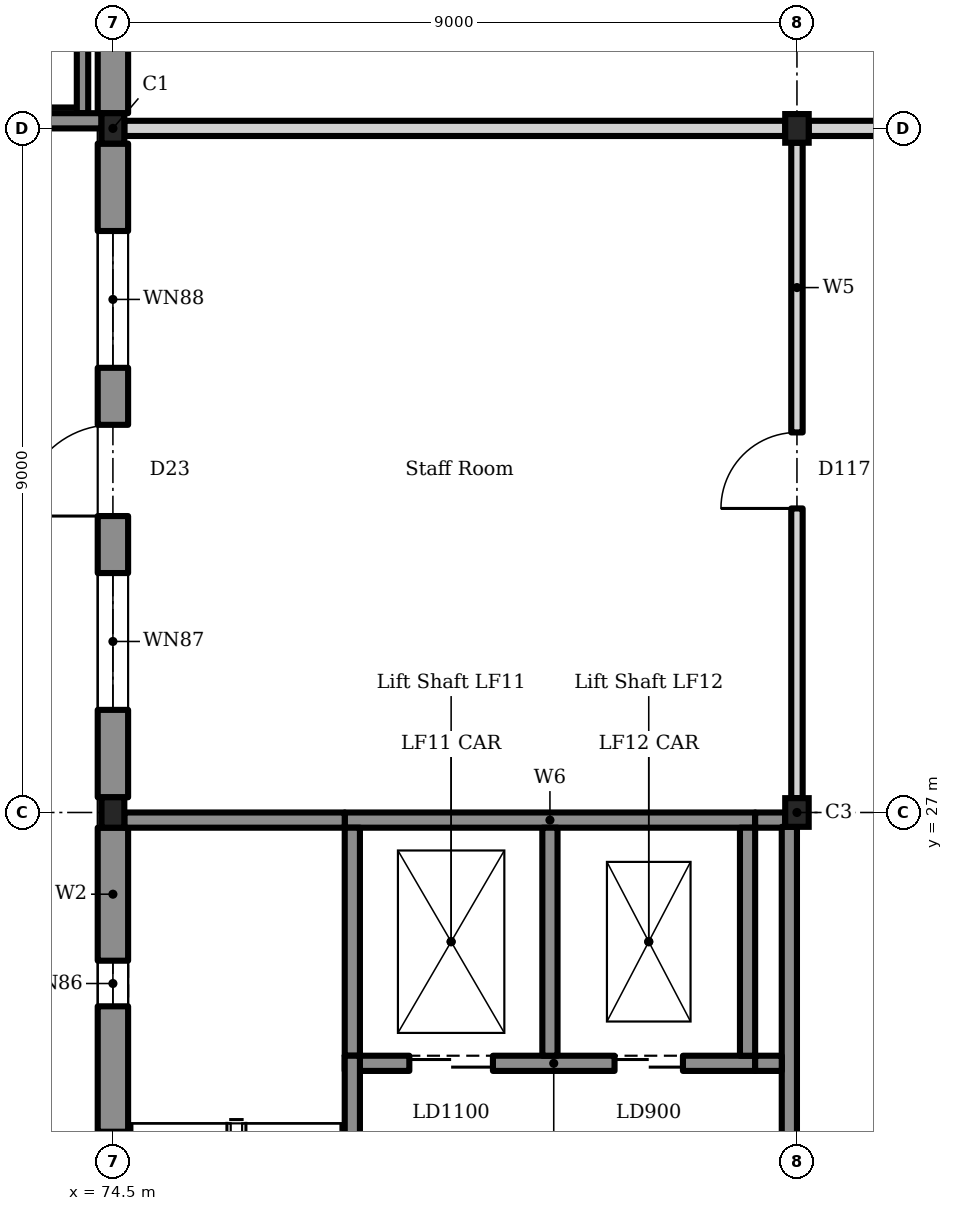
"""IFC4 building model, lengths in metres.
Left out: names, types, materials, properties, quantities, classifications, styles, units other than length and angle.
Written with IfcOpenShell. Run it as: python <this file> out.ifc"""

import sys

from ifc_helpers import new_model, si_unit, direction, frame, frame_2d, origin, origin_2d, place, context, subcontext, project, spatial, rectangle, i_section, extrude, element, fill, save


model = new_model("IFC4")
c1 = context("Model", 3, precision=1e-05, world=origin(), true_north=direction((0.0, 1.0)))
c2 = subcontext(c1, "Body", "Model", "MODEL_VIEW")
j1 = project(units=[si_unit("LENGTHUNIT", "METRE"), si_unit("PLANEANGLEUNIT", "RADIAN")], contexts=[c1])
p1 = place(None, origin())
s1 = spatial("IfcSite", under=j1, at=p1, CompositionType="ELEMENT")
p2 = place(p1, origin())
s2 = spatial("IfcBuilding", under=s1, at=p2, CompositionType="ELEMENT")
p3 = place(p2, frame((0.0, 0.0, 9.9)))
s3 = spatial("IfcBuildingStorey", under=s2, at=p3, CompositionType="ELEMENT", Elevation=9.9)
p4 = place(p3, frame((74.5, 27.0, 0.0), z_axis=(0.0, 0.0, 1.0), x_axis=(1.0, 0.0, 0.0)))
e1 = element("IfcColumn", 1, at=p4, inside=s3, PredefinedType="COLUMN", context=c2, shape_type="SweptSolid", body=[
    extrude(i_section(OverallWidth=0.3, OverallDepth=0.4, WebThickness=0.013, FlangeThickness=0.024, FilletRadius=0.027, at=origin_2d()), origin(), (0.0, 0.0, 1.0), 4.5),
])
p5 = place(p3, frame((83.5, 27.0, 0.0), z_axis=(0.0, 0.0, 1.0), x_axis=(1.0, 0.0, 0.0)))
e2 = element("IfcColumn", 2, at=p5, inside=s3, PredefinedType="COLUMN", context=c2, shape_type="SweptSolid", body=[
    extrude(i_section(OverallWidth=0.309, OverallDepth=0.377, WebThickness=0.021, FlangeThickness=0.04, FilletRadius=0.027, at=origin_2d()), origin(), (0.0, 0.0, 1.0), 4.5),
])
p6 = place(p3, frame((74.5, 36.0, 0.0), z_axis=(0.0, 0.0, 1.0), x_axis=(1.0, 0.0, 0.0)))
e3 = element("IfcColumn", 3, at=p6, inside=s3, PredefinedType="COLUMN", context=c2, shape_type="SweptSolid", body=[
    extrude(i_section(OverallWidth=0.3, OverallDepth=0.4, WebThickness=0.013, FlangeThickness=0.024, FilletRadius=0.027, at=origin_2d()), origin(), (0.0, 0.0, 1.0), 4.5),
])
p7 = place(p3, frame((83.5, 36.0, 0.0), z_axis=(0.0, 0.0, 1.0), x_axis=(1.0, 0.0, 0.0)))
e4 = element("IfcColumn", 4, at=p7, inside=s3, PredefinedType="COLUMN", context=c2, shape_type="SweptSolid", body=[
    extrude(i_section(OverallWidth=0.309, OverallDepth=0.377, WebThickness=0.021, FlangeThickness=0.04, FilletRadius=0.027, at=origin_2d()), origin(), (0.0, 0.0, 1.0), 4.5),
])
p8 = place(p3, frame((77.55, 23.7, 0.0), z_axis=(0.0, 0.0, 1.0), x_axis=(1.0, 0.0, 0.0)))
e5 = element("IfcWall", 5, at=p8, inside=s3, PredefinedType="SOLIDWALL", context=c2, shape_type="SweptSolid", body=[
    extrude(rectangle(XDim=5.4, YDim=0.2, at=frame_2d((2.7, 0.0))), origin(), (0.0, 0.0, 1.0), 4.25),
])
p9 = place(p8, frame((0.85, 0.0, 0.0)))
e6 = element("IfcOpeningElement", 6, at=p9, cuts=e5, PredefinedType="OPENING", context=c2, shape_type="SweptSolid", body=[
    extrude(rectangle(XDim=1.1, YDim=2.1, at=frame_2d((0.55, 1.05))), frame((0.0, 0.11, 0.0), z_axis=(0.0, -1.0, 0.0), x_axis=(1.0, 0.0, 0.0)), (0.0, 0.0, 1.0), 0.22),
])
p10 = place(p8, frame((3.55, 0.0, 0.0)))
e7 = element("IfcOpeningElement", 7, at=p10, cuts=e5, PredefinedType="OPENING", context=c2, shape_type="SweptSolid", body=[
    extrude(rectangle(XDim=0.9, YDim=2.1, at=frame_2d((0.45, 1.05))), frame((0.0, 0.11, 0.0), z_axis=(0.0, -1.0, 0.0), x_axis=(1.0, 0.0, 0.0)), (0.0, 0.0, 1.0), 0.22),
])
p11 = place(p3, frame((77.55, 26.9, 0.0), z_axis=(0.0, 0.0, 1.0), x_axis=(1.0, 0.0, 0.0)))
e8 = element("IfcWall", 8, at=p11, inside=s3, PredefinedType="SOLIDWALL", context=c2, shape_type="SweptSolid", body=[
    extrude(rectangle(XDim=5.4, YDim=0.2, at=frame_2d((2.7, 0.0))), origin(), (0.0, 0.0, 1.0), 4.25),
])
for number, where, z_axis, x_axis in (
    (9, (77.65, 23.8, 0.0), (0.0, 0.0, 1.0), (0.0, 1.0, 0.0)),
    (10, (80.25, 23.8, 0.0), (0.0, 0.0, 1.0), (0.0, 1.0, 0.0)),
    (11, (82.85, 23.8, 0.0), (0.0, 0.0, 1.0), (0.0, 1.0, 0.0)),
):
    element("IfcWall", number, at=place(p3, frame(where, z_axis=z_axis, x_axis=x_axis)), inside=s3, PredefinedType="SOLIDWALL", context=c2, shape_type="SweptSolid", body=[
        extrude(rectangle(XDim=3.0, YDim=0.2, at=frame_2d((1.5, 0.0))), origin(), (0.0, 0.0, 1.0), 4.25),
    ])
for number, where, z_axis, x_axis in (
    (12, (65.5, 36.2, 3.0), (0.0, 0.0, 1.0), (1.0, 0.0, 0.0)),
    (13, (74.1, 36.2, 3.0), (0.0, 0.0, 1.0), (0.0, 1.0, 0.0)),
):
    element("IfcWall", number, at=place(p3, frame(where, z_axis=z_axis, x_axis=x_axis)), inside=s3, PredefinedType="SOLIDWALL", context=c2, shape_type="SweptSolid", body=[
        extrude(rectangle(XDim=8.6, YDim=0.15, at=frame_2d((4.3, 0.0))), origin(), (0.0, 0.0, 1.0), 0.15),
    ])
p12 = place(p3, frame((74.5, 18.2, 0.0), z_axis=(0.0, 0.0, 1.0), x_axis=(0.0, 1.0, 0.0)))
e14 = element("IfcWall", 14, at=p12, inside=s3, PredefinedType="SOLIDWALL", context=c2, shape_type="SweptSolid", body=[
    extrude(rectangle(XDim=8.6, YDim=0.4, at=frame_2d((4.3, 0.0))), origin(), (0.0, 0.0, 1.0), 4.5),
])
p13 = place(p12, frame((1.75, 0.0, 0.9)))
e15 = element("IfcOpeningElement", 15, at=p13, cuts=e14, PredefinedType="OPENING", context=c2, shape_type="SweptSolid", body=[
    extrude(rectangle(XDim=0.6, YDim=2.4, at=frame_2d((0.3, 1.2))), frame((0.0, 0.21, 0.0), z_axis=(0.0, -1.0, 0.0), x_axis=(1.0, 0.0, 0.0)), (0.0, 0.0, 1.0), 0.42),
])
p14 = place(p12, frame((4.0, 0.0, 0.9)))
e16 = element("IfcOpeningElement", 16, at=p14, cuts=e14, PredefinedType="OPENING", context=c2, shape_type="SweptSolid", body=[
    extrude(rectangle(XDim=0.6, YDim=2.4, at=frame_2d((0.3, 1.2))), frame((0.0, 0.21, 0.0), z_axis=(0.0, -1.0, 0.0), x_axis=(1.0, 0.0, 0.0)), (0.0, 0.0, 1.0), 0.42),
])
p15 = place(p12, frame((6.25, 0.0, 0.9)))
e17 = element("IfcOpeningElement", 17, at=p15, cuts=e14, PredefinedType="OPENING", context=c2, shape_type="SweptSolid", body=[
    extrude(rectangle(XDim=0.6, YDim=2.4, at=frame_2d((0.3, 1.2))), frame((0.0, 0.21, 0.0), z_axis=(0.0, -1.0, 0.0), x_axis=(1.0, 0.0, 0.0)), (0.0, 0.0, 1.0), 0.42),
])
p16 = place(p3, frame((74.5, 27.2, 0.0), z_axis=(0.0, 0.0, 1.0), x_axis=(0.0, 1.0, 0.0)))
e18 = element("IfcWall", 18, at=p16, inside=s3, PredefinedType="SOLIDWALL", context=c2, shape_type="SweptSolid", body=[
    extrude(rectangle(XDim=8.6, YDim=0.4, at=frame_2d((4.3, 0.0))), origin(), (0.0, 0.0, 1.0), 4.5),
])
p17 = place(p16, frame((3.7, 0.0, 0.0)))
e19 = element("IfcOpeningElement", 19, at=p17, cuts=e18, PredefinedType="OPENING", context=c2, shape_type="SweptSolid", body=[
    extrude(rectangle(XDim=1.2, YDim=2.4, at=frame_2d((0.6, 1.2))), frame((0.0, 0.21, 0.0), z_axis=(0.0, -1.0, 0.0), x_axis=(1.0, 0.0, 0.0)), (0.0, 0.0, 1.0), 0.42),
])
p18 = place(p16, frame((1.15, 0.0, 0.9)))
e20 = element("IfcOpeningElement", 20, at=p18, cuts=e18, PredefinedType="OPENING", context=c2, shape_type="SweptSolid", body=[
    extrude(rectangle(XDim=1.8, YDim=2.1, at=frame_2d((0.9, 1.05))), frame((0.0, 0.21, 0.0), z_axis=(0.0, -1.0, 0.0), x_axis=(1.0, 0.0, 0.0)), (0.0, 0.0, 1.0), 0.42),
])
p19 = place(p16, frame((5.65, 0.0, 0.9)))
e21 = element("IfcOpeningElement", 21, at=p19, cuts=e18, PredefinedType="OPENING", context=c2, shape_type="SweptSolid", body=[
    extrude(rectangle(XDim=1.8, YDim=2.1, at=frame_2d((0.9, 1.05))), frame((0.0, 0.21, 0.0), z_axis=(0.0, -1.0, 0.0), x_axis=(1.0, 0.0, 0.0)), (0.0, 0.0, 1.0), 0.42),
])
p20 = place(p3, frame((74.5, 36.2, 0.0), z_axis=(0.0, 0.0, 1.0), x_axis=(0.0, 1.0, 0.0)))
e22 = element("IfcWall", 22, at=p20, inside=s3, PredefinedType="SOLIDWALL", context=c2, shape_type="SweptSolid", body=[
    extrude(rectangle(XDim=8.45, YDim=0.4, at=frame_2d((4.225, 0.0))), origin(), (0.0, 0.0, 1.0), 4.5),
])
p21 = place(p20, frame((1.675, 0.0, 0.9)))
e23 = element("IfcOpeningElement", 23, at=p21, cuts=e22, PredefinedType="OPENING", context=c2, shape_type="SweptSolid", body=[
    extrude(rectangle(XDim=0.6, YDim=2.4, at=frame_2d((0.3, 1.2))), frame((0.0, 0.21, 0.0), z_axis=(0.0, -1.0, 0.0), x_axis=(1.0, 0.0, 0.0)), (0.0, 0.0, 1.0), 0.42),
])
p22 = place(p20, frame((3.925, 0.0, 0.9)))
e24 = element("IfcOpeningElement", 24, at=p22, cuts=e22, PredefinedType="OPENING", context=c2, shape_type="SweptSolid", body=[
    extrude(rectangle(XDim=0.6, YDim=2.4, at=frame_2d((0.3, 1.2))), frame((0.0, 0.21, 0.0), z_axis=(0.0, -1.0, 0.0), x_axis=(1.0, 0.0, 0.0)), (0.0, 0.0, 1.0), 0.42),
])
p23 = place(p20, frame((6.175, 0.0, 0.9)))
e25 = element("IfcOpeningElement", 25, at=p23, cuts=e22, PredefinedType="OPENING", context=c2, shape_type="SweptSolid", body=[
    extrude(rectangle(XDim=0.6, YDim=2.4, at=frame_2d((0.3, 1.2))), frame((0.0, 0.21, 0.0), z_axis=(0.0, -1.0, 0.0), x_axis=(1.0, 0.0, 0.0)), (0.0, 0.0, 1.0), 0.42),
])
p24 = place(p3, frame((65.7, 36.1, 0.0), z_axis=(0.0, 0.0, 1.0), x_axis=(1.0, 0.0, 0.0)))
e26 = element("IfcWall", 26, at=p24, inside=s3, PredefinedType="SOLIDWALL", context=c2, shape_type="SweptSolid", body=[
    extrude(rectangle(XDim=8.65, YDim=0.2, at=frame_2d((4.325, 0.0))), origin(), (0.0, 0.0, 1.0), 2.8),
])
p25 = place(p24, frame((5.2, 0.0, 0.0)))
e27 = element("IfcOpeningElement", 27, at=p25, cuts=e26, PredefinedType="OPENING", context=c2, shape_type="SweptSolid", body=[
    extrude(rectangle(XDim=1.2, YDim=2.1, at=frame_2d((0.6, 1.05))), frame((0.0, 0.11, 0.0), z_axis=(0.0, -1.0, 0.0), x_axis=(1.0, 0.0, 0.0)), (0.0, 0.0, 1.0), 0.22),
])
p26 = place(p3, frame((74.65, 26.9, 0.0), z_axis=(0.0, 0.0, 1.0), x_axis=(1.0, 0.0, 0.0)))
e28 = element("IfcWall", 28, at=p26, inside=s3, PredefinedType="SOLIDWALL", context=c2, shape_type="SweptSolid", body=[
    extrude(rectangle(XDim=2.9, YDim=0.2, at=frame_2d((1.45, 0.0))), origin(), (0.0, 0.0, 1.0), 4.25),
])
p27 = place(p3, frame((82.95, 26.9, 0.0), z_axis=(0.0, 0.0, 1.0), x_axis=(1.0, 0.0, 0.0)))
e29 = element("IfcWall", 29, at=p27, inside=s3, PredefinedType="SOLIDWALL", context=c2, shape_type="SweptSolid", body=[
    extrude(rectangle(XDim=0.396, YDim=0.2, at=frame_2d((0.198, 0.0))), origin(), (0.0, 0.0, 1.0), 4.25),
])
p28 = place(p3, frame((83.4, 18.2, 0.0), z_axis=(0.0, 0.0, 1.0), x_axis=(0.0, 1.0, 0.0)))
e30 = element("IfcWall", 30, at=p28, inside=s3, PredefinedType="SOLIDWALL", context=c2, shape_type="SweptSolid", body=[
    extrude(rectangle(XDim=8.612, YDim=0.2, at=frame_2d((4.306, 0.0))), origin(), (0.0, 0.0, 1.0), 4.25),
])
p29 = place(p28, frame((2.75, 0.0, 0.0)))
e31 = element("IfcOpeningElement", 31, at=p29, cuts=e30, PredefinedType="OPENING", context=c2, shape_type="SweptSolid", body=[
    extrude(rectangle(XDim=1.1, YDim=2.1, at=frame_2d((0.55, 1.05))), frame((0.0, 0.11, 0.0), z_axis=(0.0, -1.0, 0.0), x_axis=(1.0, 0.0, 0.0)), (0.0, 0.0, 1.0), 0.22),
])
p30 = place(p3, frame((77.65, 18.2, 0.0), z_axis=(0.0, 0.0, 1.0), x_axis=(0.0, 1.0, 0.0)))
e32 = element("IfcWall", 32, at=p30, inside=s3, PredefinedType="SOLIDWALL", context=c2, shape_type="SweptSolid", body=[
    extrude(rectangle(XDim=5.6, YDim=0.2, at=frame_2d((2.8, 0.0))), origin(), (0.0, 0.0, 1.0), 4.25),
])
p31 = place(p30, frame((0.1, 0.0, 0.0)))
e33 = element("IfcOpeningElement", 33, at=p31, cuts=e32, PredefinedType="OPENING", context=c2, shape_type="SweptSolid", body=[
    extrude(rectangle(XDim=1.1, YDim=2.1, at=frame_2d((0.55, 1.05))), frame((0.0, 0.11, 0.0), z_axis=(0.0, -1.0, 0.0), x_axis=(1.0, 0.0, 0.0)), (0.0, 0.0, 1.0), 0.22),
])
p32 = place(p3, frame((82.95, 23.7, 0.0), z_axis=(0.0, 0.0, 1.0), x_axis=(1.0, 0.0, 0.0)))
e34 = element("IfcWall", 34, at=p32, inside=s3, PredefinedType="SOLIDWALL", context=c2, shape_type="SweptSolid", body=[
    extrude(rectangle(XDim=0.35, YDim=0.2, at=frame_2d((0.175, 0.0))), origin(), (0.0, 0.0, 1.0), 4.25),
])
p33 = place(p3, frame((74.65, 36.0, 0.0), z_axis=(0.0, 0.0, 1.0), x_axis=(1.0, 0.0, 0.0)))
e35 = element("IfcWall", 35, at=p33, inside=s3, PredefinedType="SOLIDWALL", context=c2, shape_type="SweptSolid", body=[
    extrude(rectangle(XDim=8.696, YDim=0.2, at=frame_2d((4.348, 0.0))), origin(), (0.0, 0.0, 1.0), 3.6),
])
p34 = place(p3, frame((83.655, 36.0, 0.0), z_axis=(0.0, 0.0, 1.0), x_axis=(1.0, 0.0, 0.0)))
e36 = element("IfcWall", 36, at=p34, inside=s3, PredefinedType="SOLIDWALL", context=c2, shape_type="SweptSolid", body=[
    extrude(rectangle(XDim=6.345, YDim=0.2, at=frame_2d((3.173, 0.0))), origin(), (0.0, 0.0, 1.0), 3.6),
])
p35 = place(p3, frame((83.5, 27.188, 0.0), z_axis=(0.0, 0.0, 1.0), x_axis=(0.0, 1.0, 0.0)))
e37 = element("IfcWall", 37, at=p35, inside=s3, PredefinedType="PARTITIONING", context=c2, shape_type="SweptSolid", body=[
    extrude(rectangle(XDim=8.623, YDim=0.15, at=frame_2d((4.312, 0.0))), origin(), (0.0, 0.0, 1.0), 3.6),
])
p36 = place(p35, frame((3.812, 0.0, 0.0)))
e38 = element("IfcOpeningElement", 38, at=p36, cuts=e37, PredefinedType="OPENING", context=c2, shape_type="SweptSolid", body=[
    extrude(rectangle(XDim=1.0, YDim=2.1, at=frame_2d((0.5, 1.05))), frame((0.0, 0.085, 0.0), z_axis=(0.0, -1.0, 0.0), x_axis=(1.0, 0.0, 0.0)), (0.0, 0.0, 1.0), 0.17),
])
p37 = place(p9, origin())
e39 = element("IfcDoor", 39, at=p37, inside=s3, OperationType="SLIDING_TO_LEFT", PredefinedType="DOOR", context=c2, shape_type="SweptSolid", body=[
    extrude(rectangle(XDim=1.1, YDim=2.1, at=frame_2d((0.55, 1.05))), frame((0.0, 0.025, 0.0), z_axis=(0.0, -1.0, 0.0), x_axis=(1.0, 0.0, 0.0)), (0.0, 0.0, 1.0), 0.05),
])
fill(e6, e39)
p38 = place(p10, origin())
e40 = element("IfcDoor", 40, at=p38, inside=s3, OperationType="SLIDING_TO_LEFT", PredefinedType="DOOR", context=c2, shape_type="SweptSolid", body=[
    extrude(rectangle(XDim=0.9, YDim=2.1, at=frame_2d((0.45, 1.05))), frame((0.0, 0.025, 0.0), z_axis=(0.0, -1.0, 0.0), x_axis=(1.0, 0.0, 0.0)), (0.0, 0.0, 1.0), 0.05),
])
fill(e7, e40)
p39 = place(p17, origin())
e41 = element("IfcDoor", 41, at=p39, inside=s3, OperationType="DOUBLE_DOOR_SINGLE_SWING", PredefinedType="DOOR", context=c2, shape_type="SweptSolid", body=[
    extrude(rectangle(XDim=1.2, YDim=2.4, at=frame_2d((0.6, 1.2))), frame((0.0, 0.025, 0.0), z_axis=(0.0, -1.0, 0.0), x_axis=(1.0, 0.0, 0.0)), (0.0, 0.0, 1.0), 0.05),
])
fill(e19, e41)
p40 = place(p15, origin())
e42 = element("IfcWindow", 42, at=p40, inside=s3, PartitioningType="SINGLE_PANEL", PredefinedType="WINDOW", context=c2, shape_type="SweptSolid", body=[
    extrude(rectangle(XDim=0.6, YDim=2.4, at=frame_2d((0.3, 1.2))), frame((0.0, 0.03, 0.0), z_axis=(0.0, -1.0, 0.0), x_axis=(1.0, 0.0, 0.0)), (0.0, 0.0, 1.0), 0.06),
])
fill(e17, e42)
p41 = place(p18, origin())
e43 = element("IfcWindow", 43, at=p41, inside=s3, PartitioningType="SINGLE_PANEL", PredefinedType="WINDOW", context=c2, shape_type="SweptSolid", body=[
    extrude(rectangle(XDim=1.8, YDim=2.1, at=frame_2d((0.9, 1.05))), frame((0.0, 0.03, 0.0), z_axis=(0.0, -1.0, 0.0), x_axis=(1.0, 0.0, 0.0)), (0.0, 0.0, 1.0), 0.06),
])
fill(e20, e43)
p42 = place(p19, origin())
e44 = element("IfcWindow", 44, at=p42, inside=s3, PartitioningType="SINGLE_PANEL", PredefinedType="WINDOW", context=c2, shape_type="SweptSolid", body=[
    extrude(rectangle(XDim=1.8, YDim=2.1, at=frame_2d((0.9, 1.05))), frame((0.0, 0.03, 0.0), z_axis=(0.0, -1.0, 0.0), x_axis=(1.0, 0.0, 0.0)), (0.0, 0.0, 1.0), 0.06),
])
fill(e21, e44)
p43 = place(p36, origin())
e45 = element("IfcDoor", 45, at=p43, inside=s3, OperationType="SINGLE_SWING_RIGHT", PredefinedType="DOOR", context=c2, shape_type="SweptSolid", body=[
    extrude(rectangle(XDim=1.0, YDim=2.1, at=frame_2d((0.5, 1.05))), frame((0.0, 0.025, 0.0), z_axis=(0.0, -1.0, 0.0), x_axis=(1.0, 0.0, 0.0)), (0.0, 0.0, 1.0), 0.05),
])
fill(e38, e45)
save(model, sys.argv[1])
